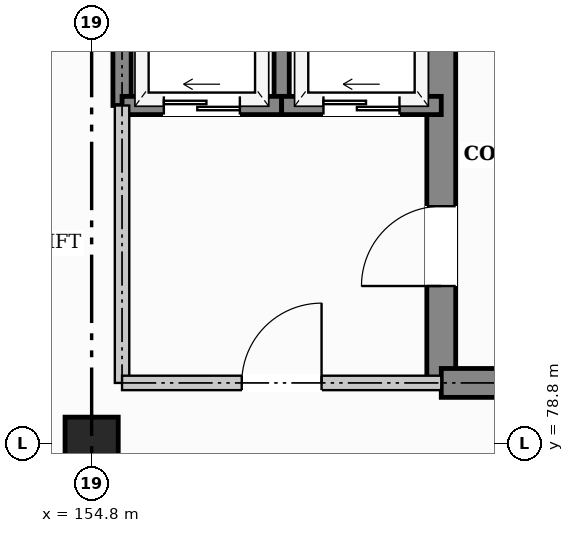
"""IFC4 building model, lengths in metres.
Left out: names, types, materials, properties, quantities, classifications, styles, units other than length and angle.
Written with IfcOpenShell. Run it as: python <this file> out.ifc"""

import sys

from ifc_helpers import new_model, si_unit, direction, frame, frame_2d, origin, origin_2d, place, context, subcontext, project, spatial, rectangle, extrude, element, fill, save


model = new_model("IFC4")
c1 = context("Model", 3, precision=1e-05, world=origin(), true_north=direction((0.0, 1.0)))
c2 = subcontext(c1, "Body", "Model", "MODEL_VIEW")
j1 = project(units=[si_unit("LENGTHUNIT", "METRE"), si_unit("PLANEANGLEUNIT", "RADIAN")], contexts=[c1])
p1 = place(None, origin())
s1 = spatial("IfcSite", under=j1, at=p1, CompositionType="ELEMENT")
p2 = place(p1, origin())
s2 = spatial("IfcBuilding", under=s1, at=p2, CompositionType="ELEMENT")
p3 = place(p2, frame((0.0, 0.0, 16.8)))
s3 = spatial("IfcBuildingStorey", under=s2, at=p3, CompositionType="ELEMENT", Elevation=16.8)
p4 = place(p3, frame((154.8, 78.8, 0.0), z_axis=(0.0, 0.0, 1.0), x_axis=(1.0, 0.0, 0.0)))
e1 = element("IfcColumn", 1, at=p4, inside=s3, PredefinedType="COLUMN", context=c2, shape_type="SweptSolid", body=[
    extrude(rectangle(XDim=0.7, YDim=0.7, at=origin_2d()), origin(), (0.0, 0.0, 1.0), 3.6),
])
p5 = place(p3, frame((159.4, 79.6, 0.0), z_axis=(0.0, 0.0, 1.0), x_axis=(0.0, 1.0, 0.0)))
e2 = element("IfcWall", 2, at=p5, inside=s3, PredefinedType="SHEAR", context=c2, shape_type="SweptSolid", body=[
    extrude(rectangle(XDim=6.0, YDim=0.38, at=frame_2d((3.0, 0.0))), origin(), (0.0, 0.0, 1.0), 3.32),
])
p6 = place(p5, frame((1.275, 0.0, 0.0)))
e3 = element("IfcOpeningElement", 3, at=p6, cuts=e2, PredefinedType="OPENING", context=c2, shape_type="SweptSolid", body=[
    extrude(rectangle(XDim=1.05, YDim=2.15, at=frame_2d((0.525, 1.075))), frame((0.0, 0.2, 0.0), z_axis=(0.0, -1.0, 0.0), x_axis=(1.0, 0.0, 0.0)), (0.0, 0.0, 1.0), 0.4),
])
p7 = place(p3, frame((159.4, 79.6, 0.0), z_axis=(0.0, 0.0, 1.0), x_axis=(1.0, 0.0, 0.0)))
e4 = element("IfcWall", 4, at=p7, inside=s3, PredefinedType="SHEAR", context=c2, shape_type="SweptSolid", body=[
    extrude(rectangle(XDim=7.0, YDim=0.38, at=frame_2d((3.5, 0.0))), origin(), (0.0, 0.0, 1.0), 3.32),
])
p8 = place(p3, frame((155.2, 83.25, 0.0), z_axis=(0.0, 0.0, 1.0), x_axis=(0.0, 1.0, 0.0)))
e5 = element("IfcWall", 5, at=p8, inside=s3, PredefinedType="SHEAR", context=c2, shape_type="SweptSolid", body=[
    extrude(rectangle(XDim=2.35, YDim=0.24, at=frame_2d((1.175, 0.0))), origin(), (0.0, 0.0, 1.0), 3.32),
])
p9 = place(p3, frame((157.3, 83.25, 0.0), z_axis=(0.0, 0.0, 1.0), x_axis=(0.0, 1.0, 0.0)))
e6 = element("IfcWall", 6, at=p9, inside=s3, PredefinedType="SHEAR", context=c2, shape_type="SweptSolid", body=[
    extrude(rectangle(XDim=2.35, YDim=0.2, at=frame_2d((1.175, 0.0))), origin(), (0.0, 0.0, 1.0), 3.32),
])
p10 = place(p3, frame((155.2, 83.25, 0.0), z_axis=(0.0, 0.0, 1.0), x_axis=(1.0, 0.0, 0.0)))
e7 = element("IfcWall", 7, at=p10, inside=s3, PredefinedType="SHEAR", context=c2, shape_type="SweptSolid", body=[
    extrude(rectangle(XDim=2.1, YDim=0.24, at=frame_2d((1.05, 0.0))), origin(), (0.0, 0.0, 1.0), 3.32),
])
p11 = place(p10, frame((0.55, 0.0, 0.0)))
e8 = element("IfcOpeningElement", 8, at=p11, cuts=e7, PredefinedType="OPENING", context=c2, shape_type="SweptSolid", body=[
    extrude(rectangle(XDim=1.0, YDim=2.1, at=frame_2d((0.5, 1.05))), frame((0.0, 0.13, 0.0), z_axis=(0.0, -1.0, 0.0), x_axis=(1.0, 0.0, 0.0)), (0.0, 0.0, 1.0), 0.26),
])
p12 = place(p3, frame((157.3, 83.25, 0.0), z_axis=(0.0, 0.0, 1.0), x_axis=(1.0, 0.0, 0.0)))
e9 = element("IfcWall", 9, at=p12, inside=s3, PredefinedType="SHEAR", context=c2, shape_type="SweptSolid", body=[
    extrude(rectangle(XDim=2.1, YDim=0.24, at=frame_2d((1.05, 0.0))), origin(), (0.0, 0.0, 1.0), 3.32),
])
p13 = place(p12, frame((0.55, 0.0, 0.0)))
e10 = element("IfcOpeningElement", 10, at=p13, cuts=e9, PredefinedType="OPENING", context=c2, shape_type="SweptSolid", body=[
    extrude(rectangle(XDim=1.0, YDim=2.1, at=frame_2d((0.5, 1.05))), frame((0.0, 0.13, 0.0), z_axis=(0.0, -1.0, 0.0), x_axis=(1.0, 0.0, 0.0)), (0.0, 0.0, 1.0), 0.26),
])
p14 = place(p3, frame((155.2, 79.6, 0.0), z_axis=(0.0, 0.0, 1.0), x_axis=(0.0, 1.0, 0.0)))
e11 = element("IfcWall", 11, at=p14, inside=s3, PredefinedType="PARTITIONING", context=c2, shape_type="SweptSolid", body=[
    extrude(rectangle(XDim=3.65, YDim=0.19, at=frame_2d((1.825, 0.0))), origin(), (0.0, 0.0, 1.0), 3.32),
])
p15 = place(p3, frame((155.2, 79.6, 0.0), z_axis=(0.0, 0.0, 1.0), x_axis=(1.0, 0.0, 0.0)))
e12 = element("IfcWall", 12, at=p15, inside=s3, PredefinedType="PARTITIONING", context=c2, shape_type="SweptSolid", body=[
    extrude(rectangle(XDim=4.2, YDim=0.19, at=frame_2d((2.1, 0.0))), origin(), (0.0, 0.0, 1.0), 3.32),
])
p16 = place(p15, frame((1.575, 0.0, 0.0)))
e13 = element("IfcOpeningElement", 13, at=p16, cuts=e12, PredefinedType="OPENING", context=c2, shape_type="SweptSolid", body=[
    extrude(rectangle(XDim=1.05, YDim=2.15, at=frame_2d((0.525, 1.075))), frame((0.0, 0.105, 0.0), z_axis=(0.0, -1.0, 0.0), x_axis=(1.0, 0.0, 0.0)), (0.0, 0.0, 1.0), 0.21),
])
p17 = place(p6, origin())
e14 = element("IfcDoor", 14, at=p17, inside=s3, OperationType="SINGLE_SWING_LEFT", PredefinedType="DOOR", context=c2, shape_type="SweptSolid", body=[
    extrude(rectangle(XDim=1.05, YDim=2.15, at=frame_2d((0.525, 1.075))), frame((0.0, 0.025, 0.0), z_axis=(0.0, -1.0, 0.0), x_axis=(1.0, 0.0, 0.0)), (0.0, 0.0, 1.0), 0.05),
])
fill(e3, e14)
p18 = place(p11, origin())
e15 = element("IfcDoor", 15, at=p18, inside=s3, OperationType="SLIDING_TO_LEFT", PredefinedType="DOOR", context=c2, shape_type="SweptSolid", body=[
    extrude(rectangle(XDim=1.0, YDim=2.1, at=frame_2d((0.5, 1.05))), frame((0.0, 0.025, 0.0), z_axis=(0.0, -1.0, 0.0), x_axis=(1.0, 0.0, 0.0)), (0.0, 0.0, 1.0), 0.05),
])
fill(e8, e15)
p19 = place(p13, origin())
e16 = element("IfcDoor", 16, at=p19, inside=s3, OperationType="SLIDING_TO_LEFT", PredefinedType="DOOR", context=c2, shape_type="SweptSolid", body=[
    extrude(rectangle(XDim=1.0, YDim=2.1, at=frame_2d((0.5, 1.05))), frame((0.0, 0.025, 0.0), z_axis=(0.0, -1.0, 0.0), x_axis=(1.0, 0.0, 0.0)), (0.0, 0.0, 1.0), 0.05),
])
fill(e10, e16)
p20 = place(p16, origin())
e17 = element("IfcDoor", 17, at=p20, inside=s3, OperationType="SINGLE_SWING_RIGHT", PredefinedType="DOOR", context=c2, shape_type="SweptSolid", body=[
    extrude(rectangle(XDim=1.05, YDim=2.15, at=frame_2d((0.525, 1.075))), frame((0.0, 0.025, 0.0), z_axis=(0.0, -1.0, 0.0), x_axis=(1.0, 0.0, 0.0)), (0.0, 0.0, 1.0), 0.05),
])
fill(e13, e17)
save(model, sys.argv[1])
